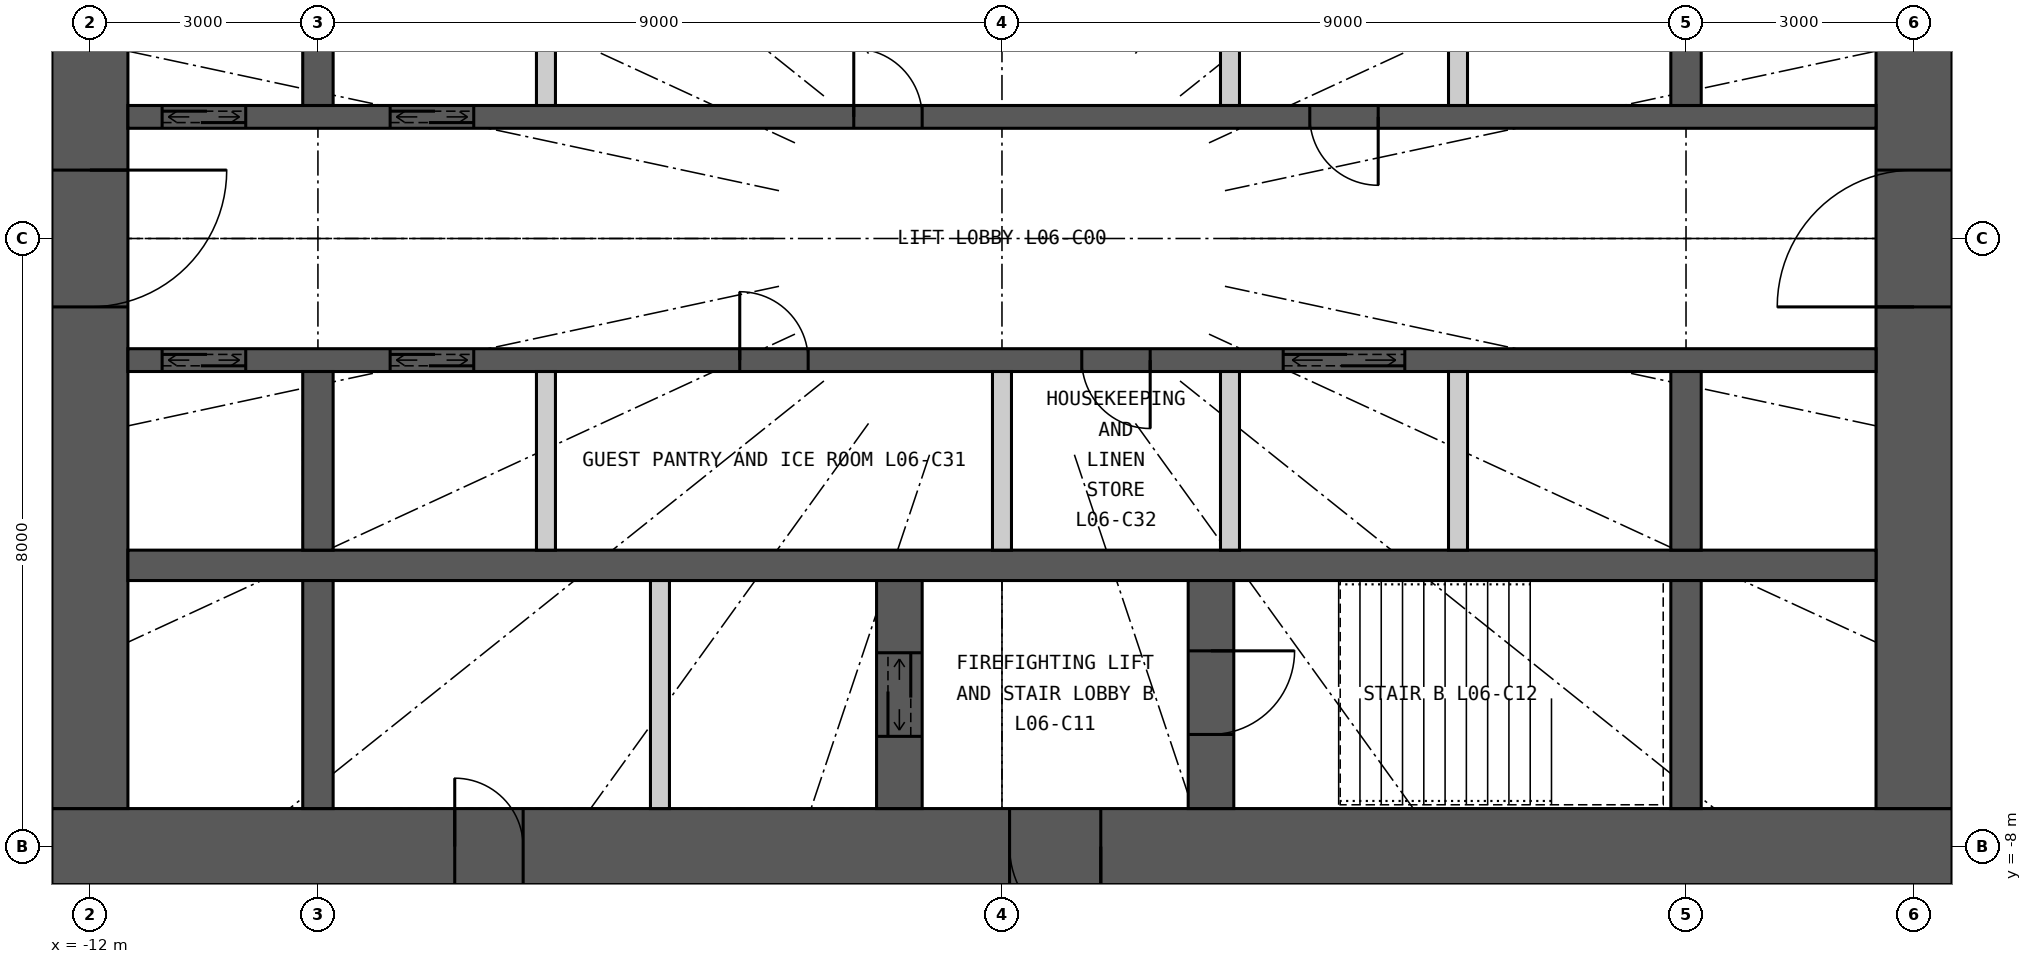
"""IFC4 building model, lengths in metres.
Left out: names, types, materials, properties, quantities, classifications, styles, units other than length and angle.
Written with IfcOpenShell. Run it as: python <this file> out.ifc"""

import sys

from ifc_helpers import new_model, si_unit, direction, frame, frame_2d, origin, place, context, subcontext, project, spatial, rectangle, extrude, element, fill, save


model = new_model("IFC4")
c1 = context("Model", 3, precision=1e-05, world=origin(), true_north=direction((0.0, 1.0)))
c2 = subcontext(c1, "Body", "Model", "MODEL_VIEW")
j1 = project(units=[si_unit("LENGTHUNIT", "METRE"), si_unit("PLANEANGLEUNIT", "RADIAN")], contexts=[c1])
p1 = place(None, origin())
s1 = spatial("IfcSite", under=j1, at=p1, CompositionType="ELEMENT")
p2 = place(p1, origin())
s2 = spatial("IfcBuilding", under=s1, at=p2, CompositionType="ELEMENT")
p3 = place(p2, frame((0.0, 0.0, 32.7)))
s3 = spatial("IfcBuildingStorey", under=s2, at=p3, CompositionType="ELEMENT", Elevation=32.7)
p4 = place(p3, frame((12.5, -8.0, 0.0), z_axis=(0.0, 0.0, 1.0), x_axis=(-1.0, 0.0, 0.0)))
e1 = element("IfcWall", 1, at=p4, inside=s3, PredefinedType="SHEAR", context=c2, shape_type="SweptSolid", body=[
    extrude(rectangle(XDim=25.0, YDim=1.0, at=frame_2d((12.5, 0.0))), origin(), (0.0, 0.0, 1.0), 3.3),
])
p5 = place(p4, frame((11.2, 0.0, 0.0)))
e2 = element("IfcOpeningElement", 2, at=p5, cuts=e1, PredefinedType="OPENING", context=c2, shape_type="SweptSolid", body=[
    extrude(rectangle(XDim=1.2, YDim=2.2, at=frame_2d((0.6, 1.1))), frame((0.0, 0.51, 0.0), z_axis=(0.0, -1.0, 0.0), x_axis=(1.0, 0.0, 0.0)), (0.0, 0.0, 1.0), 1.02),
])
p6 = place(p4, frame((18.8, 0.0, 0.0)))
e3 = element("IfcOpeningElement", 3, at=p6, cuts=e1, PredefinedType="OPENING", context=c2, shape_type="SweptSolid", body=[
    extrude(rectangle(XDim=0.9, YDim=2.2, at=frame_2d((0.45, 1.1))), frame((0.0, 0.51, 0.0), z_axis=(0.0, -1.0, 0.0), x_axis=(1.0, 0.0, 0.0)), (0.0, 0.0, 1.0), 1.02),
])
p7 = place(p3, frame((12.0, -7.5, 0.0), z_axis=(0.0, 0.0, 1.0), x_axis=(0.0, 1.0, 0.0)))
e4 = element("IfcWall", 4, at=p7, inside=s3, PredefinedType="SHEAR", context=c2, shape_type="SweptSolid", body=[
    extrude(rectangle(XDim=15.0, YDim=1.0, at=frame_2d((7.5, 0.0))), origin(), (0.0, 0.0, 1.0), 3.3),
])
p8 = place(p7, frame((6.6, 0.0, 0.0)))
e5 = element("IfcOpeningElement", 5, at=p8, cuts=e4, PredefinedType="OPENING", context=c2, shape_type="SweptSolid", body=[
    extrude(rectangle(XDim=1.8, YDim=2.2, at=frame_2d((0.9, 1.1))), frame((0.0, 0.51, 0.0), z_axis=(0.0, -1.0, 0.0), x_axis=(1.0, 0.0, 0.0)), (0.0, 0.0, 1.0), 1.02),
])
p9 = place(p3, frame((-12.0, 7.5, 0.0), z_axis=(0.0, 0.0, 1.0), x_axis=(0.0, -1.0, 0.0)))
e6 = element("IfcWall", 6, at=p9, inside=s3, PredefinedType="SHEAR", context=c2, shape_type="SweptSolid", body=[
    extrude(rectangle(XDim=15.0, YDim=1.0, at=frame_2d((7.5, 0.0))), origin(), (0.0, 0.0, 1.0), 3.3),
])
p10 = place(p9, frame((6.6, 0.0, 0.0)))
e7 = element("IfcOpeningElement", 7, at=p10, cuts=e6, PredefinedType="OPENING", context=c2, shape_type="SweptSolid", body=[
    extrude(rectangle(XDim=1.8, YDim=2.2, at=frame_2d((0.9, 1.1))), frame((0.0, 0.51, 0.0), z_axis=(0.0, -1.0, 0.0), x_axis=(1.0, 0.0, 0.0)), (0.0, 0.0, 1.0), 1.02),
])
p11 = place(p3, frame((-11.5, 1.6, 0.0), z_axis=(0.0, 0.0, 1.0), x_axis=(1.0, 0.0, 0.0)))
e8 = element("IfcWall", 8, at=p11, inside=s3, PredefinedType="SHEAR", context=c2, shape_type="SweptSolid", body=[
    extrude(rectangle(XDim=23.0, YDim=0.3, at=frame_2d((11.5, 0.0))), origin(), (0.0, 0.0, 1.0), 3.3),
])
p12 = place(p11, frame((0.45, 0.0, 0.0)))
e9 = element("IfcOpeningElement", 9, at=p12, cuts=e8, PredefinedType="OPENING", context=c2, shape_type="SweptSolid", body=[
    extrude(rectangle(XDim=1.1, YDim=2.2, at=frame_2d((0.55, 1.1))), frame((0.0, 0.16, 0.0), z_axis=(0.0, -1.0, 0.0), x_axis=(1.0, 0.0, 0.0)), (0.0, 0.0, 1.0), 0.32),
])
p13 = place(p11, frame((3.45, 0.0, 0.0)))
e10 = element("IfcOpeningElement", 10, at=p13, cuts=e8, PredefinedType="OPENING", context=c2, shape_type="SweptSolid", body=[
    extrude(rectangle(XDim=1.1, YDim=2.2, at=frame_2d((0.55, 1.1))), frame((0.0, 0.16, 0.0), z_axis=(0.0, -1.0, 0.0), x_axis=(1.0, 0.0, 0.0)), (0.0, 0.0, 1.0), 0.32),
])
p14 = place(p11, frame((9.55, 0.0, 0.0)))
e11 = element("IfcOpeningElement", 11, at=p14, cuts=e8, PredefinedType="OPENING", context=c2, shape_type="SweptSolid", body=[
    extrude(rectangle(XDim=0.9, YDim=2.2, at=frame_2d((0.45, 1.1))), frame((0.0, 0.16, 0.0), z_axis=(0.0, -1.0, 0.0), x_axis=(1.0, 0.0, 0.0)), (0.0, 0.0, 1.0), 0.32),
])
p15 = place(p11, frame((15.55, 0.0, 0.0)))
e12 = element("IfcOpeningElement", 12, at=p15, cuts=e8, PredefinedType="OPENING", context=c2, shape_type="SweptSolid", body=[
    extrude(rectangle(XDim=0.9, YDim=2.2, at=frame_2d((0.45, 1.1))), frame((0.0, 0.16, 0.0), z_axis=(0.0, -1.0, 0.0), x_axis=(1.0, 0.0, 0.0)), (0.0, 0.0, 1.0), 0.32),
])
p16 = place(p3, frame((-11.5, -4.3, 0.0), z_axis=(0.0, 0.0, 1.0), x_axis=(1.0, 0.0, 0.0)))
e13 = element("IfcWall", 13, at=p16, inside=s3, PredefinedType="SHEAR", context=c2, shape_type="SweptSolid", body=[
    extrude(rectangle(XDim=23.0, YDim=0.4, at=frame_2d((11.5, 0.0))), origin(), (0.0, 0.0, 1.0), 3.3),
])
p17 = place(p3, frame((-11.5, -1.6, 0.0), z_axis=(0.0, 0.0, 1.0), x_axis=(1.0, 0.0, 0.0)))
e14 = element("IfcWall", 14, at=p17, inside=s3, PredefinedType="SHEAR", context=c2, shape_type="SweptSolid", body=[
    extrude(rectangle(XDim=23.0, YDim=0.3, at=frame_2d((11.5, 0.0))), origin(), (0.0, 0.0, 1.0), 3.3),
])
p18 = place(p17, frame((0.45, 0.0, 0.0)))
e15 = element("IfcOpeningElement", 15, at=p18, cuts=e14, PredefinedType="OPENING", context=c2, shape_type="SweptSolid", body=[
    extrude(rectangle(XDim=1.1, YDim=2.2, at=frame_2d((0.55, 1.1))), frame((0.0, 0.16, 0.0), z_axis=(0.0, -1.0, 0.0), x_axis=(1.0, 0.0, 0.0)), (0.0, 0.0, 1.0), 0.32),
])
p19 = place(p17, frame((3.45, 0.0, 0.0)))
e16 = element("IfcOpeningElement", 16, at=p19, cuts=e14, PredefinedType="OPENING", context=c2, shape_type="SweptSolid", body=[
    extrude(rectangle(XDim=1.1, YDim=2.2, at=frame_2d((0.55, 1.1))), frame((0.0, 0.16, 0.0), z_axis=(0.0, -1.0, 0.0), x_axis=(1.0, 0.0, 0.0)), (0.0, 0.0, 1.0), 0.32),
])
p20 = place(p17, frame((15.2, 0.0, 0.0)))
e17 = element("IfcOpeningElement", 17, at=p20, cuts=e14, PredefinedType="OPENING", context=c2, shape_type="SweptSolid", body=[
    extrude(rectangle(XDim=1.6, YDim=2.4, at=frame_2d((0.8, 1.2))), frame((0.0, 0.16, 0.0), z_axis=(0.0, -1.0, 0.0), x_axis=(1.0, 0.0, 0.0)), (0.0, 0.0, 1.0), 0.32),
])
p21 = place(p17, frame((8.05, 0.0, 0.0)))
e18 = element("IfcOpeningElement", 18, at=p21, cuts=e14, PredefinedType="OPENING", context=c2, shape_type="SweptSolid", body=[
    extrude(rectangle(XDim=0.9, YDim=2.2, at=frame_2d((0.45, 1.1))), frame((0.0, 0.16, 0.0), z_axis=(0.0, -1.0, 0.0), x_axis=(1.0, 0.0, 0.0)), (0.0, 0.0, 1.0), 0.32),
])
p22 = place(p17, frame((12.55, 0.0, 0.0)))
e19 = element("IfcOpeningElement", 19, at=p22, cuts=e14, PredefinedType="OPENING", context=c2, shape_type="SweptSolid", body=[
    extrude(rectangle(XDim=0.9, YDim=2.2, at=frame_2d((0.45, 1.1))), frame((0.0, 0.16, 0.0), z_axis=(0.0, -1.0, 0.0), x_axis=(1.0, 0.0, 0.0)), (0.0, 0.0, 1.0), 0.32),
])
for number, where, z_axis, x_axis in (
    (20, (-9.0, 1.75, 0.0), (0.0, 0.0, 1.0), (0.0, 1.0, 0.0)),
    (21, (-9.0, -4.1, 0.0), (0.0, 0.0, 1.0), (0.0, 1.0, 0.0)),
):
    element("IfcWall", number, at=place(p3, frame(where, z_axis=z_axis, x_axis=x_axis)), inside=s3, PredefinedType="SHEAR", context=c2, shape_type="SweptSolid", body=[
        extrude(rectangle(XDim=2.35, YDim=0.4, at=frame_2d((1.175, 0.0))), origin(), (0.0, 0.0, 1.0), 3.3),
    ])
p23 = place(p3, frame((-9.0, -7.5, 0.0), z_axis=(0.0, 0.0, 1.0), x_axis=(0.0, 1.0, 0.0)))
e22 = element("IfcWall", 22, at=p23, inside=s3, PredefinedType="SHEAR", context=c2, shape_type="SweptSolid", body=[
    extrude(rectangle(XDim=3.0, YDim=0.4, at=frame_2d((1.5, 0.0))), origin(), (0.0, 0.0, 1.0), 3.3),
])
for number, where, z_axis, x_axis in (
    (23, (9.0, 1.75, 0.0), (0.0, 0.0, 1.0), (0.0, 1.0, 0.0)),
    (24, (9.0, -4.1, 0.0), (0.0, 0.0, 1.0), (0.0, 1.0, 0.0)),
):
    element("IfcWall", number, at=place(p3, frame(where, z_axis=z_axis, x_axis=x_axis)), inside=s3, PredefinedType="SHEAR", context=c2, shape_type="SweptSolid", body=[
        extrude(rectangle(XDim=2.35, YDim=0.4, at=frame_2d((1.175, 0.0))), origin(), (0.0, 0.0, 1.0), 3.3),
    ])
p24 = place(p3, frame((9.0, -7.5, 0.0), z_axis=(0.0, 0.0, 1.0), x_axis=(0.0, 1.0, 0.0)))
e25 = element("IfcWall", 25, at=p24, inside=s3, PredefinedType="SHEAR", context=c2, shape_type="SweptSolid", body=[
    extrude(rectangle(XDim=3.0, YDim=0.4, at=frame_2d((1.5, 0.0))), origin(), (0.0, 0.0, 1.0), 3.3),
])
p25 = place(p3, frame((2.75, -7.5, 0.0), z_axis=(0.0, 0.0, 1.0), x_axis=(0.0, 1.0, 0.0)))
e26 = element("IfcWall", 26, at=p25, inside=s3, PredefinedType="SHEAR", context=c2, shape_type="SweptSolid", body=[
    extrude(rectangle(XDim=3.0, YDim=0.6, at=frame_2d((1.5, 0.0))), origin(), (0.0, 0.0, 1.0), 3.3),
])
p26 = place(p25, frame((0.975, 0.0, 0.0)))
e27 = element("IfcOpeningElement", 27, at=p26, cuts=e26, PredefinedType="OPENING", context=c2, shape_type="SweptSolid", body=[
    extrude(rectangle(XDim=1.1, YDim=2.2, at=frame_2d((0.55, 1.1))), frame((0.0, 0.31, 0.0), z_axis=(0.0, -1.0, 0.0), x_axis=(1.0, 0.0, 0.0)), (0.0, 0.0, 1.0), 0.62),
])
p27 = place(p3, frame((-1.35, -7.5, 0.0), z_axis=(0.0, 0.0, 1.0), x_axis=(0.0, 1.0, 0.0)))
e28 = element("IfcWall", 28, at=p27, inside=s3, PredefinedType="SHEAR", context=c2, shape_type="SweptSolid", body=[
    extrude(rectangle(XDim=3.0, YDim=0.6, at=frame_2d((1.5, 0.0))), origin(), (0.0, 0.0, 1.0), 3.3),
])
p28 = place(p27, frame((0.95, 0.0, 0.0)))
e29 = element("IfcOpeningElement", 29, at=p28, cuts=e28, PredefinedType="OPENING", context=c2, shape_type="SweptSolid", body=[
    extrude(rectangle(XDim=1.1, YDim=2.2, at=frame_2d((0.55, 1.1))), frame((0.0, 0.31, 0.0), z_axis=(0.0, -1.0, 0.0), x_axis=(1.0, 0.0, 0.0)), (0.0, 0.0, 1.0), 0.62),
])
p29 = place(p3, frame((-4.5, -7.5, 0.0), z_axis=(0.0, 0.0, 1.0), x_axis=(0.0, 1.0, 0.0)))
e30 = element("IfcWall", 30, at=p29, inside=s3, PredefinedType="PARTITIONING", context=c2, shape_type="SweptSolid", body=[
    extrude(rectangle(XDim=3.0, YDim=0.25, at=frame_2d((1.5, 0.0))), origin(), (0.0, 0.0, 1.0), 3.3),
])
for number, where, z_axis, x_axis in (
    (31, (-6.0, 1.75, 0.0), (0.0, 0.0, 1.0), (0.0, 1.0, 0.0)),
    (32, (3.0, 1.75, 0.0), (0.0, 0.0, 1.0), (0.0, 1.0, 0.0)),
    (33, (6.0, 1.75, 0.0), (0.0, 0.0, 1.0), (0.0, 1.0, 0.0)),
    (34, (-6.0, -4.1, 0.0), (0.0, 0.0, 1.0), (0.0, 1.0, 0.0)),
    (35, (0.0, -4.1, 0.0), (0.0, 0.0, 1.0), (0.0, 1.0, 0.0)),
    (36, (3.0, -4.1, 0.0), (0.0, 0.0, 1.0), (0.0, 1.0, 0.0)),
    (37, (6.0, -4.1, 0.0), (0.0, 0.0, 1.0), (0.0, 1.0, 0.0)),
):
    element("IfcWall", number, at=place(p3, frame(where, z_axis=z_axis, x_axis=x_axis)), inside=s3, PredefinedType="PARTITIONING", context=c2, shape_type="SweptSolid", body=[
        extrude(rectangle(XDim=2.35, YDim=0.25, at=frame_2d((1.175, 0.0))), origin(), (0.0, 0.0, 1.0), 3.3),
    ])
p30 = place(p5, origin())
e38 = element("IfcDoor", 38, at=p30, inside=s3, OperationType="SINGLE_SWING_LEFT", PredefinedType="DOOR", context=c2, shape_type="SweptSolid", body=[
    extrude(rectangle(XDim=1.2, YDim=2.2, at=frame_2d((0.6, 1.1))), frame((0.0, 0.025, 0.0), z_axis=(0.0, -1.0, 0.0), x_axis=(1.0, 0.0, 0.0)), (0.0, 0.0, 1.0), 0.05),
])
fill(e2, e38)
p31 = place(p26, origin())
e39 = element("IfcDoor", 39, at=p31, inside=s3, OperationType="SINGLE_SWING_RIGHT", PredefinedType="DOOR", context=c2, shape_type="SweptSolid", body=[
    extrude(rectangle(XDim=1.1, YDim=2.2, at=frame_2d((0.55, 1.1))), frame((0.0, 0.025, 0.0), z_axis=(0.0, -1.0, 0.0), x_axis=(1.0, 0.0, 0.0)), (0.0, 0.0, 1.0), 0.05),
])
fill(e27, e39)
p32 = place(p28, origin())
e40 = element("IfcDoor", 40, at=p32, inside=s3, OperationType="DOUBLE_DOOR_SLIDING", PredefinedType="DOOR", context=c2, shape_type="SweptSolid", body=[
    extrude(rectangle(XDim=1.1, YDim=2.2, at=frame_2d((0.55, 1.1))), frame((0.0, 0.025, 0.0), z_axis=(0.0, -1.0, 0.0), x_axis=(1.0, 0.0, 0.0)), (0.0, 0.0, 1.0), 0.05),
])
fill(e29, e40)
p33 = place(p6, origin())
e41 = element("IfcDoor", 41, at=p33, inside=s3, OperationType="SINGLE_SWING_RIGHT", PredefinedType="DOOR", context=c2, shape_type="SweptSolid", body=[
    extrude(rectangle(XDim=0.9, YDim=2.2, at=frame_2d((0.45, 1.1))), frame((0.0, 0.025, 0.0), z_axis=(0.0, -1.0, 0.0), x_axis=(1.0, 0.0, 0.0)), (0.0, 0.0, 1.0), 0.05),
])
fill(e3, e41)
p34 = place(p12, origin())
e42 = element("IfcDoor", 42, at=p34, inside=s3, OperationType="DOUBLE_DOOR_SLIDING", PredefinedType="DOOR", context=c2, shape_type="SweptSolid", body=[
    extrude(rectangle(XDim=1.1, YDim=2.2, at=frame_2d((0.55, 1.1))), frame((0.0, 0.025, 0.0), z_axis=(0.0, -1.0, 0.0), x_axis=(1.0, 0.0, 0.0)), (0.0, 0.0, 1.0), 0.05),
])
fill(e9, e42)
p35 = place(p13, origin())
e43 = element("IfcDoor", 43, at=p35, inside=s3, OperationType="DOUBLE_DOOR_SLIDING", PredefinedType="DOOR", context=c2, shape_type="SweptSolid", body=[
    extrude(rectangle(XDim=1.1, YDim=2.2, at=frame_2d((0.55, 1.1))), frame((0.0, 0.025, 0.0), z_axis=(0.0, -1.0, 0.0), x_axis=(1.0, 0.0, 0.0)), (0.0, 0.0, 1.0), 0.05),
])
fill(e10, e43)
p36 = place(p18, origin())
e44 = element("IfcDoor", 44, at=p36, inside=s3, OperationType="DOUBLE_DOOR_SLIDING", PredefinedType="DOOR", context=c2, shape_type="SweptSolid", body=[
    extrude(rectangle(XDim=1.1, YDim=2.2, at=frame_2d((0.55, 1.1))), frame((0.0, 0.025, 0.0), z_axis=(0.0, -1.0, 0.0), x_axis=(1.0, 0.0, 0.0)), (0.0, 0.0, 1.0), 0.05),
])
fill(e15, e44)
p37 = place(p19, origin())
e45 = element("IfcDoor", 45, at=p37, inside=s3, OperationType="DOUBLE_DOOR_SLIDING", PredefinedType="DOOR", context=c2, shape_type="SweptSolid", body=[
    extrude(rectangle(XDim=1.1, YDim=2.2, at=frame_2d((0.55, 1.1))), frame((0.0, 0.025, 0.0), z_axis=(0.0, -1.0, 0.0), x_axis=(1.0, 0.0, 0.0)), (0.0, 0.0, 1.0), 0.05),
])
fill(e16, e45)
p38 = place(p20, origin())
e46 = element("IfcDoor", 46, at=p38, inside=s3, OperationType="DOUBLE_DOOR_SLIDING", PredefinedType="DOOR", context=c2, shape_type="SweptSolid", body=[
    extrude(rectangle(XDim=1.6, YDim=2.4, at=frame_2d((0.8, 1.2))), frame((0.0, 0.025, 0.0), z_axis=(0.0, -1.0, 0.0), x_axis=(1.0, 0.0, 0.0)), (0.0, 0.0, 1.0), 0.05),
])
fill(e17, e46)
p39 = place(p14, origin())
e47 = element("IfcDoor", 47, at=p39, inside=s3, OperationType="SINGLE_SWING_LEFT", PredefinedType="DOOR", context=c2, shape_type="SweptSolid", body=[
    extrude(rectangle(XDim=0.9, YDim=2.2, at=frame_2d((0.45, 1.1))), frame((0.0, 0.025, 0.0), z_axis=(0.0, -1.0, 0.0), x_axis=(1.0, 0.0, 0.0)), (0.0, 0.0, 1.0), 0.05),
])
fill(e11, e47)
p40 = place(p15, origin())
e48 = element("IfcDoor", 48, at=p40, inside=s3, OperationType="SINGLE_SWING_RIGHT", PredefinedType="DOOR", context=c2, shape_type="SweptSolid", body=[
    extrude(rectangle(XDim=0.9, YDim=2.2, at=frame_2d((0.45, 1.1))), frame((0.0, 0.025, 0.0), z_axis=(0.0, -1.0, 0.0), x_axis=(1.0, 0.0, 0.0)), (0.0, 0.0, 1.0), 0.05),
])
fill(e12, e48)
p41 = place(p21, origin())
e49 = element("IfcDoor", 49, at=p41, inside=s3, OperationType="SINGLE_SWING_LEFT", PredefinedType="DOOR", context=c2, shape_type="SweptSolid", body=[
    extrude(rectangle(XDim=0.9, YDim=2.2, at=frame_2d((0.45, 1.1))), frame((0.0, 0.025, 0.0), z_axis=(0.0, -1.0, 0.0), x_axis=(1.0, 0.0, 0.0)), (0.0, 0.0, 1.0), 0.05),
])
fill(e18, e49)
p42 = place(p22, origin())
e50 = element("IfcDoor", 50, at=p42, inside=s3, OperationType="SINGLE_SWING_RIGHT", PredefinedType="DOOR", context=c2, shape_type="SweptSolid", body=[
    extrude(rectangle(XDim=0.9, YDim=2.2, at=frame_2d((0.45, 1.1))), frame((0.0, 0.025, 0.0), z_axis=(0.0, -1.0, 0.0), x_axis=(1.0, 0.0, 0.0)), (0.0, 0.0, 1.0), 0.05),
])
fill(e19, e50)
p43 = place(p8, origin())
e51 = element("IfcDoor", 51, at=p43, inside=s3, OperationType="DOUBLE_DOOR_DOUBLE_SWING", PredefinedType="DOOR", context=c2, shape_type="SweptSolid", body=[
    extrude(rectangle(XDim=1.8, YDim=2.2, at=frame_2d((0.9, 1.1))), frame((0.0, 0.025, 0.0), z_axis=(0.0, -1.0, 0.0), x_axis=(1.0, 0.0, 0.0)), (0.0, 0.0, 1.0), 0.05),
])
fill(e5, e51)
p44 = place(p10, origin())
e52 = element("IfcDoor", 52, at=p44, inside=s3, OperationType="DOUBLE_DOOR_DOUBLE_SWING", PredefinedType="DOOR", context=c2, shape_type="SweptSolid", body=[
    extrude(rectangle(XDim=1.8, YDim=2.2, at=frame_2d((0.9, 1.1))), frame((0.0, 0.025, 0.0), z_axis=(0.0, -1.0, 0.0), x_axis=(1.0, 0.0, 0.0)), (0.0, 0.0, 1.0), 0.05),
])
fill(e7, e52)
save(model, sys.argv[1])
